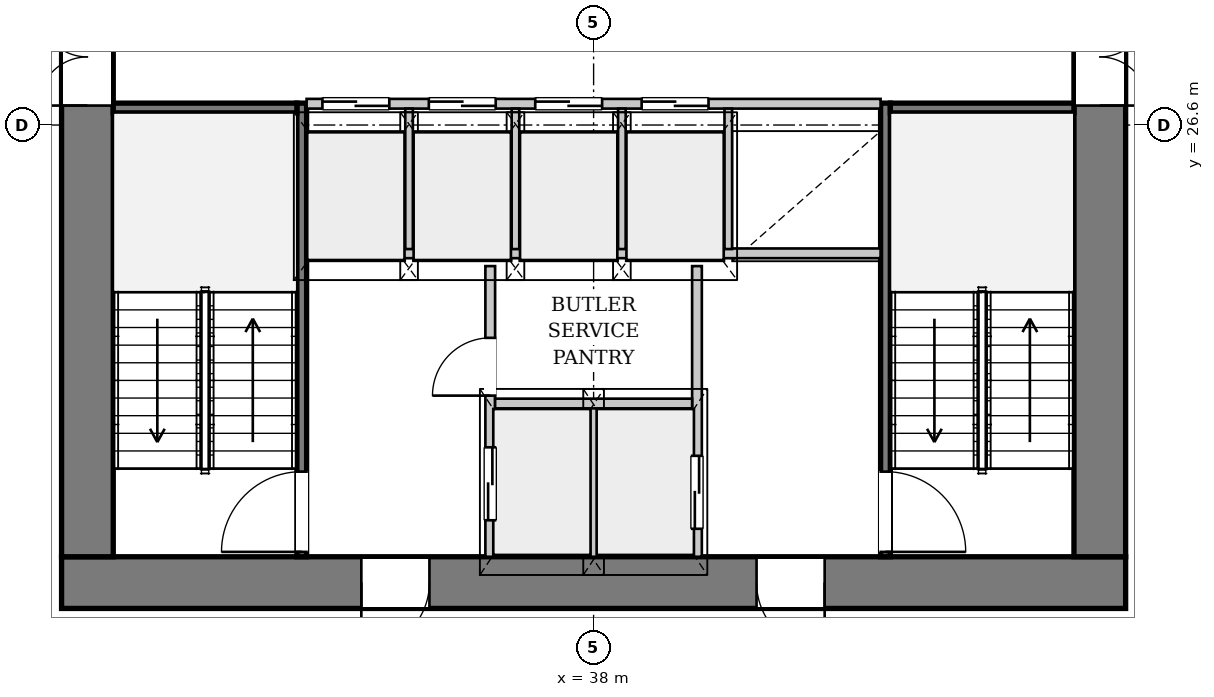
"""IFC4 building model, lengths in metres.
Left out: names, types, materials, properties, quantities, classifications, styles, units other than length and angle.
Written with IfcOpenShell. Run it as: python <this file> out.ifc"""

import sys

from ifc_helpers import new_model, si_unit, direction, frame, frame_2d, origin, place, context, subcontext, project, spatial, rectangle, extrude, source, transform, mapped, element, fill, save


model = new_model("IFC4")
c1 = context("Model", 3, precision=1e-05, world=origin(), true_north=direction((0.0, 1.0)))
c2 = subcontext(c1, "Body", "Model", "MODEL_VIEW")
j1 = project(units=[si_unit("LENGTHUNIT", "METRE"), si_unit("PLANEANGLEUNIT", "RADIAN")], contexts=[c1])
p1 = place(None, origin())
s1 = spatial("IfcSite", under=j1, at=p1, CompositionType="ELEMENT")
p2 = place(p1, origin())
s2 = spatial("IfcBuilding", under=s1, at=p2, CompositionType="ELEMENT")
p3 = place(p2, frame((0.0, 0.0, 50.6)))
s3 = spatial("IfcBuildingStorey", under=s2, at=p3, CompositionType="ELEMENT", Elevation=50.6)
p4 = place(p3, frame((46.75, 19.075, 0.0), z_axis=(0.0, 0.0, 1.0), x_axis=(-1.0, 0.0, 0.0)))
e1 = element("IfcWall", 1, at=p4, inside=s3, PredefinedType="SHEAR", context=c2, shape_type="SweptSolid", body=[
    extrude(rectangle(XDim=17.5, YDim=0.85, at=frame_2d((8.75, 0.0))), origin(), (0.0, 0.0, 1.0), 3.3),
])
p5 = place(p4, frame((4.95, 0.0, 0.0)))
e2 = element("IfcOpeningElement", 2, at=p5, cuts=e1, PredefinedType="OPENING", context=c2, shape_type="SweptSolid", body=[
    extrude(rectangle(XDim=1.12, YDim=2.25, at=frame_2d((0.56, 1.125))), frame((0.0, 0.435, 0.0), z_axis=(0.0, -1.0, 0.0), x_axis=(1.0, 0.0, 0.0)), (0.0, 0.0, 1.0), 0.87),
])
p6 = place(p4, frame((11.45, 0.0, 0.0)))
e3 = element("IfcOpeningElement", 3, at=p6, cuts=e1, PredefinedType="OPENING", context=c2, shape_type="SweptSolid", body=[
    extrude(rectangle(XDim=1.12, YDim=2.25, at=frame_2d((0.56, 1.125))), frame((0.0, 0.435, 0.0), z_axis=(0.0, -1.0, 0.0), x_axis=(1.0, 0.0, 0.0)), (0.0, 0.0, 1.0), 0.87),
])
p7 = place(p3, frame((29.675, 19.5, 0.0), z_axis=(0.0, 0.0, 1.0), x_axis=(0.0, 1.0, 0.0)))
e4 = element("IfcWall", 4, at=p7, inside=s3, PredefinedType="SHEAR", context=c2, shape_type="SweptSolid", body=[
    extrude(rectangle(XDim=14.2, YDim=0.85, at=frame_2d((7.1, 0.0))), origin(), (0.0, 0.0, 1.0), 3.3),
])
p8 = place(p7, frame((7.42, 0.0, 0.0)))
e5 = element("IfcOpeningElement", 5, at=p8, cuts=e4, PredefinedType="OPENING", context=c2, shape_type="SweptSolid", body=[
    extrude(rectangle(XDim=1.6, YDim=2.2, at=frame_2d((0.8, 1.1))), frame((0.0, 0.435, 0.0), z_axis=(0.0, -1.0, 0.0), x_axis=(1.0, 0.0, 0.0)), (0.0, 0.0, 1.0), 0.87),
])
p9 = place(p3, frame((46.325, 33.7, 0.0), z_axis=(0.0, 0.0, 1.0), x_axis=(0.0, -1.0, 0.0)))
e6 = element("IfcWall", 6, at=p9, inside=s3, PredefinedType="SHEAR", context=c2, shape_type="SweptSolid", body=[
    extrude(rectangle(XDim=14.2, YDim=0.85, at=frame_2d((7.1, 0.0))), origin(), (0.0, 0.0, 1.0), 3.3),
])
p10 = place(p9, frame((5.18, 0.0, 0.0)))
e7 = element("IfcOpeningElement", 7, at=p10, cuts=e6, PredefinedType="OPENING", context=c2, shape_type="SweptSolid", body=[
    extrude(rectangle(XDim=1.6, YDim=2.2, at=frame_2d((0.8, 1.1))), frame((0.0, 0.435, 0.0), z_axis=(0.0, -1.0, 0.0), x_axis=(1.0, 0.0, 0.0)), (0.0, 0.0, 1.0), 0.87),
])
p11 = place(p3, frame((33.2, 19.5, 0.0), z_axis=(0.0, 0.0, 1.0), x_axis=(0.0, 1.0, 0.0)))
e8 = element("IfcWall", 8, at=p11, inside=s3, PredefinedType="PARTITIONING", context=c2, shape_type="SweptSolid", body=[
    extrude(rectangle(XDim=7.46, YDim=0.16, at=frame_2d((3.73, 0.0))), origin(), (0.0, 0.0, 1.0), 3.3),
])
p12 = place(p11, frame((0.08, 0.0, 0.0)))
e9 = element("IfcOpeningElement", 9, at=p12, cuts=e8, PredefinedType="OPENING", context=c2, shape_type="SweptSolid", body=[
    extrude(rectangle(XDim=1.32, YDim=2.2, at=frame_2d((0.66, 1.1))), frame((0.0, 0.09, 0.0), z_axis=(0.0, -1.0, 0.0), x_axis=(1.0, 0.0, 0.0)), (0.0, 0.0, 1.0), 0.18),
])
p13 = place(p3, frame((30.1, 26.88, 0.0), z_axis=(0.0, 0.0, 1.0), x_axis=(1.0, 0.0, 0.0)))
e10 = element("IfcWall", 10, at=p13, inside=s3, PredefinedType="PARTITIONING", context=c2, shape_type="SweptSolid", body=[
    extrude(rectangle(XDim=3.02, YDim=0.16, at=frame_2d((1.51, 0.0))), origin(), (0.0, 0.0, 1.0), 3.3),
])
p14 = place(p3, frame((42.8, 26.96, 0.0), z_axis=(0.0, 0.0, 1.0), x_axis=(0.0, -1.0, 0.0)))
e11 = element("IfcWall", 11, at=p14, inside=s3, PredefinedType="PARTITIONING", context=c2, shape_type="SweptSolid", body=[
    extrude(rectangle(XDim=7.46, YDim=0.16, at=frame_2d((3.73, 0.0))), origin(), (0.0, 0.0, 1.0), 3.3),
])
p15 = place(p14, frame((6.06, 0.0, 0.0)))
e12 = element("IfcOpeningElement", 12, at=p15, cuts=e11, PredefinedType="OPENING", context=c2, shape_type="SweptSolid", body=[
    extrude(rectangle(XDim=1.32, YDim=2.2, at=frame_2d((0.66, 1.1))), frame((0.0, 0.09, 0.0), z_axis=(0.0, -1.0, 0.0), x_axis=(1.0, 0.0, 0.0)), (0.0, 0.0, 1.0), 0.18),
])
p16 = place(p3, frame((42.88, 26.88, 0.0), z_axis=(0.0, 0.0, 1.0), x_axis=(1.0, 0.0, 0.0)))
e13 = element("IfcWall", 13, at=p16, inside=s3, PredefinedType="PARTITIONING", context=c2, shape_type="SweptSolid", body=[
    extrude(rectangle(XDim=3.02, YDim=0.16, at=frame_2d((1.51, 0.0))), origin(), (0.0, 0.0, 1.0), 3.3),
])
p17 = place(p3, frame((36.3, 19.5, 0.0), z_axis=(0.0, 0.0, 1.0), x_axis=(0.0, 1.0, 0.0)))
e14 = element("IfcWall", 14, at=p17, inside=s3, PredefinedType="PARTITIONING", context=c2, shape_type="SweptSolid", body=[
    extrude(rectangle(XDim=4.78, YDim=0.16, at=frame_2d((2.39, 0.0))), origin(), (0.0, 0.0, 1.0), 3.3),
])
p18 = place(p17, frame((0.6, 0.0, 0.0)))
e15 = element("IfcOpeningElement", 15, at=p18, cuts=e14, PredefinedType="OPENING", context=c2, shape_type="SweptSolid", body=[
    extrude(rectangle(XDim=1.2, YDim=2.2, at=frame_2d((0.6, 1.1))), frame((0.0, 0.09, 0.0), z_axis=(0.0, -1.0, 0.0), x_axis=(1.0, 0.0, 0.0)), (0.0, 0.0, 1.0), 0.18),
])
p19 = place(p17, frame((2.65, 0.0, 0.0)))
e16 = element("IfcOpeningElement", 16, at=p19, cuts=e14, PredefinedType="OPENING", context=c2, shape_type="SweptSolid", body=[
    extrude(rectangle(XDim=0.95, YDim=2.1, at=frame_2d((0.475, 1.05))), frame((0.0, 0.09, 0.0), z_axis=(0.0, -1.0, 0.0), x_axis=(1.0, 0.0, 0.0)), (0.0, 0.0, 1.0), 0.18),
])
p20 = place(p3, frame((39.7, 24.28, 0.0), z_axis=(0.0, 0.0, 1.0), x_axis=(0.0, -1.0, 0.0)))
e17 = element("IfcWall", 17, at=p20, inside=s3, PredefinedType="PARTITIONING", context=c2, shape_type="SweptSolid", body=[
    extrude(rectangle(XDim=4.78, YDim=0.16, at=frame_2d((2.39, 0.0))), origin(), (0.0, 0.0, 1.0), 3.3),
])
p21 = place(p20, frame((3.12, 0.0, 0.0)))
e18 = element("IfcOpeningElement", 18, at=p21, cuts=e17, PredefinedType="OPENING", context=c2, shape_type="SweptSolid", body=[
    extrude(rectangle(XDim=1.2, YDim=2.2, at=frame_2d((0.6, 1.1))), frame((0.0, 0.09, 0.0), z_axis=(0.0, -1.0, 0.0), x_axis=(1.0, 0.0, 0.0)), (0.0, 0.0, 1.0), 0.18),
])
p22 = place(p3, frame((38.0, 19.5, 0.0), z_axis=(0.0, 0.0, 1.0), x_axis=(0.0, 1.0, 0.0)))
e19 = element("IfcWall", 19, at=p22, inside=s3, PredefinedType="PARTITIONING", context=c2, shape_type="SweptSolid", body=[
    extrude(rectangle(XDim=2.46, YDim=0.125, at=frame_2d((1.23, 0.0))), origin(), (0.0, 0.0, 1.0), 3.3),
])
p23 = place(p3, frame((36.38, 22.02, 0.0), z_axis=(0.0, 0.0, 1.0), x_axis=(1.0, 0.0, 0.0)))
e20 = element("IfcWall", 20, at=p23, inside=s3, PredefinedType="PARTITIONING", context=c2, shape_type="SweptSolid", body=[
    extrude(rectangle(XDim=3.24, YDim=0.16, at=frame_2d((1.62, 0.0))), origin(), (0.0, 0.0, 1.0), 3.3),
])
p24 = place(p3, frame((33.28, 24.49, 0.0), z_axis=(0.0, 0.0, 1.0), x_axis=(1.0, 0.0, 0.0)))
e21 = element("IfcWall", 21, at=p24, inside=s3, PredefinedType="PARTITIONING", context=c2, shape_type="SweptSolid", body=[
    extrude(rectangle(XDim=9.44, YDim=0.16, at=frame_2d((4.72, 0.0))), origin(), (0.0, 0.0, 1.0), 3.3),
])
p25 = place(p3, frame((33.28, 26.95, 0.0), z_axis=(0.0, 0.0, 1.0), x_axis=(1.0, 0.0, 0.0)))
e22 = element("IfcWall", 22, at=p25, inside=s3, PredefinedType="PARTITIONING", context=c2, shape_type="SweptSolid", body=[
    extrude(rectangle(XDim=9.44, YDim=0.16, at=frame_2d((4.72, 0.0))), origin(), (0.0, 0.0, 1.0), 3.3),
])
p26 = place(p25, frame((0.26, 0.0, 0.0)))
e23 = element("IfcOpeningElement", 23, at=p26, cuts=e22, PredefinedType="OPENING", context=c2, shape_type="SweptSolid", body=[
    extrude(rectangle(XDim=1.1, YDim=2.2, at=frame_2d((0.55, 1.1))), frame((0.0, 0.09, 0.0), z_axis=(0.0, -1.0, 0.0), x_axis=(1.0, 0.0, 0.0)), (0.0, 0.0, 1.0), 0.18),
])
p27 = place(p25, frame((2.01, 0.0, 0.0)))
e24 = element("IfcOpeningElement", 24, at=p27, cuts=e22, PredefinedType="OPENING", context=c2, shape_type="SweptSolid", body=[
    extrude(rectangle(XDim=1.1, YDim=2.2, at=frame_2d((0.55, 1.1))), frame((0.0, 0.09, 0.0), z_axis=(0.0, -1.0, 0.0), x_axis=(1.0, 0.0, 0.0)), (0.0, 0.0, 1.0), 0.18),
])
p28 = place(p25, frame((3.76, 0.0, 0.0)))
e25 = element("IfcOpeningElement", 25, at=p28, cuts=e22, PredefinedType="OPENING", context=c2, shape_type="SweptSolid", body=[
    extrude(rectangle(XDim=1.1, YDim=2.2, at=frame_2d((0.55, 1.1))), frame((0.0, 0.09, 0.0), z_axis=(0.0, -1.0, 0.0), x_axis=(1.0, 0.0, 0.0)), (0.0, 0.0, 1.0), 0.18),
])
p29 = place(p25, frame((5.51, 0.0, 0.0)))
e26 = element("IfcOpeningElement", 26, at=p29, cuts=e22, PredefinedType="OPENING", context=c2, shape_type="SweptSolid", body=[
    extrude(rectangle(XDim=1.1, YDim=2.2, at=frame_2d((0.55, 1.1))), frame((0.0, 0.09, 0.0), z_axis=(0.0, -1.0, 0.0), x_axis=(1.0, 0.0, 0.0)), (0.0, 0.0, 1.0), 0.18),
])
for number, where, z_axis, x_axis in (
    (27, (34.965, 24.56, 0.0), (0.0, 0.0, 1.0), (0.0, 1.0, 0.0)),
    (28, (36.715, 24.56, 0.0), (0.0, 0.0, 1.0), (0.0, 1.0, 0.0)),
    (29, (38.465, 24.56, 0.0), (0.0, 0.0, 1.0), (0.0, 1.0, 0.0)),
    (30, (40.215, 24.56, 0.0), (0.0, 0.0, 1.0), (0.0, 1.0, 0.0)),
):
    element("IfcWall", number, at=place(p3, frame(where, z_axis=z_axis, x_axis=x_axis)), inside=s3, PredefinedType="PARTITIONING", context=c2, shape_type="SweptSolid", body=[
        extrude(rectangle(XDim=2.31, YDim=0.125, at=frame_2d((1.155, 0.0))), origin(), (0.0, 0.0, 1.0), 3.3),
    ])
m1 = source(origin(), c2, "Body", "SweptSolid", [
    extrude(rectangle(XDim=1.12, YDim=2.25, at=frame_2d((0.56, 1.125))), frame((0.0, 0.025, 0.0), z_axis=(0.0, -1.0, 0.0), x_axis=(1.0, 0.0, 0.0)), (0.0, 0.0, 1.0), 0.05),
])
p30 = place(p5, origin())
e31 = element("IfcDoor", 31, at=p30, inside=s3, OperationType="SINGLE_SWING_LEFT", PredefinedType="DOOR", context=c2, shape_type="MappedRepresentation", body=[
    mapped(m1, transform((0.0, 0.0, 0.0), x_axis=(1.0, 0.0, 0.0), y_axis=(0.0, 1.0, 0.0), z_axis=(0.0, 0.0, 1.0), scale=1.0)),
])
fill(e2, e31)
p31 = place(p6, origin())
e32 = element("IfcDoor", 32, at=p31, inside=s3, OperationType="SINGLE_SWING_RIGHT", PredefinedType="DOOR", context=c2, shape_type="MappedRepresentation", body=[
    mapped(m1, transform((0.0, 0.0, 0.0), x_axis=(1.0, 0.0, 0.0), y_axis=(0.0, 1.0, 0.0), z_axis=(0.0, 0.0, 1.0), scale=1.0)),
])
fill(e3, e32)
m2 = source(origin(), c2, "Body", "SweptSolid", [
    extrude(rectangle(XDim=1.6, YDim=2.2, at=frame_2d((0.8, 1.1))), frame((0.0, 0.025, 0.0), z_axis=(0.0, -1.0, 0.0), x_axis=(1.0, 0.0, 0.0)), (0.0, 0.0, 1.0), 0.05),
])
p32 = place(p8, origin())
e33 = element("IfcDoor", 33, at=p32, inside=s3, OperationType="DOUBLE_DOOR_SINGLE_SWING", PredefinedType="DOOR", context=c2, shape_type="MappedRepresentation", body=[
    mapped(m2, transform((0.0, 0.0, 0.0), x_axis=(1.0, 0.0, 0.0), y_axis=(0.0, 1.0, 0.0), z_axis=(0.0, 0.0, 1.0), scale=1.0)),
])
fill(e5, e33)
p33 = place(p10, origin())
e34 = element("IfcDoor", 34, at=p33, inside=s3, OperationType="DOUBLE_DOOR_SINGLE_SWING", PredefinedType="DOOR", context=c2, shape_type="MappedRepresentation", body=[
    mapped(m2, transform((0.0, 0.0, 0.0), x_axis=(1.0, 0.0, 0.0), y_axis=(0.0, 1.0, 0.0), z_axis=(0.0, 0.0, 1.0), scale=1.0)),
])
fill(e7, e34)
m3 = source(origin(), c2, "Body", "SweptSolid", [
    extrude(rectangle(XDim=1.32, YDim=2.2, at=frame_2d((0.66, 1.1))), frame((0.0, 0.025, 0.0), z_axis=(0.0, -1.0, 0.0), x_axis=(1.0, 0.0, 0.0)), (0.0, 0.0, 1.0), 0.05),
])
p34 = place(p12, origin())
e35 = element("IfcDoor", 35, at=p34, inside=s3, OperationType="SINGLE_SWING_LEFT", PredefinedType="DOOR", context=c2, shape_type="MappedRepresentation", body=[
    mapped(m3, transform((0.0, 0.0, 0.0), x_axis=(1.0, 0.0, 0.0), y_axis=(0.0, 1.0, 0.0), z_axis=(0.0, 0.0, 1.0), scale=1.0)),
])
fill(e9, e35)
p35 = place(p15, origin())
e36 = element("IfcDoor", 36, at=p35, inside=s3, OperationType="SINGLE_SWING_RIGHT", PredefinedType="DOOR", context=c2, shape_type="MappedRepresentation", body=[
    mapped(m3, transform((0.0, 0.0, 0.0), x_axis=(1.0, 0.0, 0.0), y_axis=(0.0, 1.0, 0.0), z_axis=(0.0, 0.0, 1.0), scale=1.0)),
])
fill(e12, e36)
m4 = source(origin(), c2, "Body", "SweptSolid", [
    extrude(rectangle(XDim=1.2, YDim=2.2, at=frame_2d((0.6, 1.1))), frame((0.0, 0.025, 0.0), z_axis=(0.0, -1.0, 0.0), x_axis=(1.0, 0.0, 0.0)), (0.0, 0.0, 1.0), 0.05),
])
p36 = place(p18, origin())
e37 = element("IfcDoor", 37, at=p36, inside=s3, OperationType="DOUBLE_DOOR_SLIDING", PredefinedType="DOOR", context=c2, shape_type="MappedRepresentation", body=[
    mapped(m4, transform((0.0, 0.0, 0.0), x_axis=(1.0, 0.0, 0.0), y_axis=(0.0, 1.0, 0.0), z_axis=(0.0, 0.0, 1.0), scale=1.0)),
])
fill(e15, e37)
m5 = source(origin(), c2, "Body", "SweptSolid", [
    extrude(rectangle(XDim=0.95, YDim=2.1, at=frame_2d((0.475, 1.05))), frame((0.0, 0.025, 0.0), z_axis=(0.0, -1.0, 0.0), x_axis=(1.0, 0.0, 0.0)), (0.0, 0.0, 1.0), 0.05),
])
p37 = place(p19, origin())
e38 = element("IfcDoor", 38, at=p37, inside=s3, OperationType="SINGLE_SWING_LEFT", PredefinedType="DOOR", context=c2, shape_type="MappedRepresentation", body=[
    mapped(m5, transform((0.0, 0.0, 0.0), x_axis=(1.0, 0.0, 0.0), y_axis=(0.0, 1.0, 0.0), z_axis=(0.0, 0.0, 1.0), scale=1.0)),
])
fill(e16, e38)
p38 = place(p21, origin())
e39 = element("IfcDoor", 39, at=p38, inside=s3, OperationType="DOUBLE_DOOR_SLIDING", PredefinedType="DOOR", context=c2, shape_type="MappedRepresentation", body=[
    mapped(m4, transform((0.0, 0.0, 0.0), x_axis=(1.0, 0.0, 0.0), y_axis=(0.0, 1.0, 0.0), z_axis=(0.0, 0.0, 1.0), scale=1.0)),
])
fill(e18, e39)
m6 = source(origin(), c2, "Body", "SweptSolid", [
    extrude(rectangle(XDim=1.1, YDim=2.2, at=frame_2d((0.55, 1.1))), frame((0.0, 0.025, 0.0), z_axis=(0.0, -1.0, 0.0), x_axis=(1.0, 0.0, 0.0)), (0.0, 0.0, 1.0), 0.05),
])
p39 = place(p26, origin())
e40 = element("IfcDoor", 40, at=p39, inside=s3, OperationType="DOUBLE_DOOR_SLIDING", PredefinedType="DOOR", context=c2, shape_type="MappedRepresentation", body=[
    mapped(m6, transform((0.0, 0.0, 0.0), x_axis=(1.0, 0.0, 0.0), y_axis=(0.0, 1.0, 0.0), z_axis=(0.0, 0.0, 1.0), scale=1.0)),
])
fill(e23, e40)
p40 = place(p27, origin())
e41 = element("IfcDoor", 41, at=p40, inside=s3, OperationType="DOUBLE_DOOR_SLIDING", PredefinedType="DOOR", context=c2, shape_type="MappedRepresentation", body=[
    mapped(m6, transform((0.0, 0.0, 0.0), x_axis=(1.0, 0.0, 0.0), y_axis=(0.0, 1.0, 0.0), z_axis=(0.0, 0.0, 1.0), scale=1.0)),
])
fill(e24, e41)
p41 = place(p28, origin())
e42 = element("IfcDoor", 42, at=p41, inside=s3, OperationType="DOUBLE_DOOR_SLIDING", PredefinedType="DOOR", context=c2, shape_type="MappedRepresentation", body=[
    mapped(m6, transform((0.0, 0.0, 0.0), x_axis=(1.0, 0.0, 0.0), y_axis=(0.0, 1.0, 0.0), z_axis=(0.0, 0.0, 1.0), scale=1.0)),
])
fill(e25, e42)
p42 = place(p29, origin())
e43 = element("IfcDoor", 43, at=p42, inside=s3, OperationType="DOUBLE_DOOR_SLIDING", PredefinedType="DOOR", context=c2, shape_type="MappedRepresentation", body=[
    mapped(m6, transform((0.0, 0.0, 0.0), x_axis=(1.0, 0.0, 0.0), y_axis=(0.0, 1.0, 0.0), z_axis=(0.0, 0.0, 1.0), scale=1.0)),
])
fill(e26, e43)
save(model, sys.argv[1])
